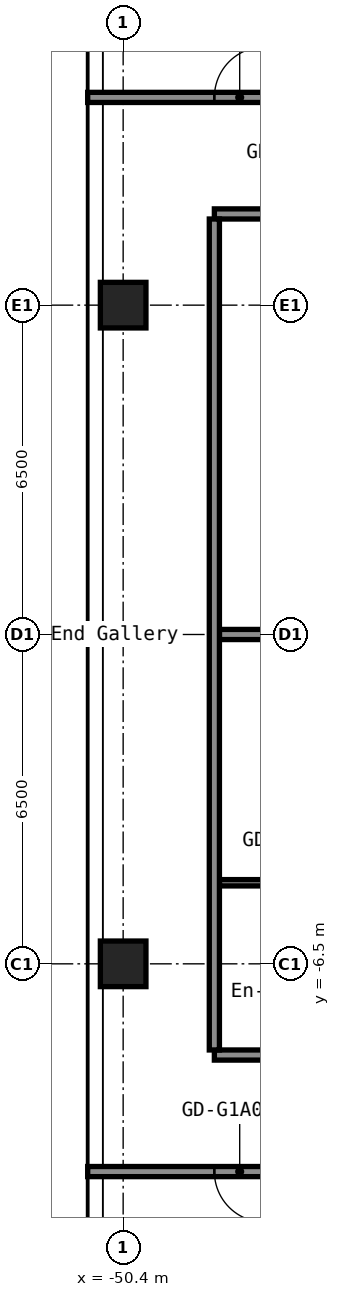
"""IFC4 building model, lengths in metres.
Left out: names, types, materials, properties, quantities, classifications, styles, units other than length and angle.
Written with IfcOpenShell. Run it as: python <this file> out.ifc"""

import sys

from ifc_helpers import new_model, si_unit, direction, frame, frame_2d, origin, origin_2d, place, context, subcontext, project, spatial, rectangle, hollow_rectangle, extrude, element, fill, save


model = new_model("IFC4")
c1 = context("Model", 3, precision=1e-05, world=origin(), true_north=direction((0.0, 1.0)))
c2 = subcontext(c1, "Body", "Model", "MODEL_VIEW")
j1 = project(units=[si_unit("LENGTHUNIT", "METRE"), si_unit("PLANEANGLEUNIT", "RADIAN")], contexts=[c1])
p1 = place(None, origin())
s1 = spatial("IfcSite", under=j1, at=p1, CompositionType="ELEMENT")
p2 = place(p1, origin())
s2 = spatial("IfcBuilding", under=s1, at=p2, CompositionType="ELEMENT")
p3 = place(p2, frame((0.0, 0.0, 19.8)))
s3 = spatial("IfcBuildingStorey", under=s2, at=p3, CompositionType="ELEMENT", Elevation=19.8)
for number, where, z_axis, x_axis in (
    (1, (-50.4, -6.5, 0.0), (0.0, 0.0, 1.0), (1.0, 0.0, 0.0)),
    (2, (-50.4, 6.5, 0.0), (0.0, 0.0, 1.0), (1.0, 0.0, 0.0)),
):
    element("IfcColumn", number, at=place(p3, frame(where, z_axis=z_axis, x_axis=x_axis)), inside=s3, PredefinedType="COLUMN", context=c2, shape_type="SweptSolid", body=[
        extrude(hollow_rectangle(XDim=0.9, YDim=0.9, WallThickness=0.036, at=origin_2d()), origin(), (0.0, 0.0, 1.0), 2.8),
    ])
p4 = place(p3, frame((-51.1, -10.6, 0.0), z_axis=(0.0, 0.0, 1.0), x_axis=(1.0, 0.0, 0.0)))
e3 = element("IfcWall", 3, at=p4, inside=s3, PredefinedType="PARTITIONING", context=c2, shape_type="SweptSolid", body=[
    extrude(rectangle(XDim=34.3, YDim=0.2, at=frame_2d((17.15, 0.0))), origin(), (0.0, 0.0, 1.0), 2.8),
])
p5 = place(p4, frame((2.5, 0.0, 0.0)))
e4 = element("IfcOpeningElement", 4, at=p5, cuts=e3, PredefinedType="OPENING", context=c2, shape_type="SweptSolid", body=[
    extrude(rectangle(XDim=1.0, YDim=2.1, at=frame_2d((0.5, 1.05))), frame((0.0, 0.11, 0.0), z_axis=(0.0, -1.0, 0.0), x_axis=(1.0, 0.0, 0.0)), (0.0, 0.0, 1.0), 0.22),
])
p6 = place(p4, frame((11.1, 0.0, 0.0)))
e5 = element("IfcOpeningElement", 5, at=p6, cuts=e3, PredefinedType="OPENING", context=c2, shape_type="SweptSolid", body=[
    extrude(rectangle(XDim=1.0, YDim=2.1, at=frame_2d((0.5, 1.05))), frame((0.0, 0.11, 0.0), z_axis=(0.0, -1.0, 0.0), x_axis=(1.0, 0.0, 0.0)), (0.0, 0.0, 1.0), 0.22),
])
p7 = place(p4, frame((19.5, 0.0, 0.0)))
e6 = element("IfcOpeningElement", 6, at=p7, cuts=e3, PredefinedType="OPENING", context=c2, shape_type="SweptSolid", body=[
    extrude(rectangle(XDim=1.0, YDim=2.1, at=frame_2d((0.5, 1.05))), frame((0.0, 0.11, 0.0), z_axis=(0.0, -1.0, 0.0), x_axis=(1.0, 0.0, 0.0)), (0.0, 0.0, 1.0), 0.22),
])
p8 = place(p4, frame((27.9, 0.0, 0.0)))
e7 = element("IfcOpeningElement", 7, at=p8, cuts=e3, PredefinedType="OPENING", context=c2, shape_type="SweptSolid", body=[
    extrude(rectangle(XDim=1.0, YDim=2.1, at=frame_2d((0.5, 1.05))), frame((0.0, 0.11, 0.0), z_axis=(0.0, -1.0, 0.0), x_axis=(1.0, 0.0, 0.0)), (0.0, 0.0, 1.0), 0.22),
])
p9 = place(p3, frame((-48.6, -8.3, 0.0), z_axis=(0.0, 0.0, 1.0), x_axis=(1.0, 0.0, 0.0)))
e8 = element("IfcWall", 8, at=p9, inside=s3, PredefinedType="PARTITIONING", context=c2, shape_type="SweptSolid", body=[
    extrude(rectangle(XDim=15.0, YDim=0.2, at=frame_2d((7.5, 0.0))), origin(), (0.0, 0.0, 1.0), 2.8),
])
p10 = place(p9, frame((4.5, 0.0, 0.0)))
e9 = element("IfcOpeningElement", 9, at=p10, cuts=e8, PredefinedType="OPENING", context=c2, shape_type="SweptSolid", body=[
    extrude(rectangle(XDim=1.0, YDim=2.1, at=frame_2d((0.5, 1.05))), frame((0.0, 0.11, 0.0), z_axis=(0.0, -1.0, 0.0), x_axis=(1.0, 0.0, 0.0)), (0.0, 0.0, 1.0), 0.22),
])
p11 = place(p9, frame((7.66, 0.0, 0.0)))
e10 = element("IfcOpeningElement", 10, at=p11, cuts=e8, PredefinedType="OPENING", context=c2, shape_type="SweptSolid", body=[
    extrude(rectangle(XDim=0.9, YDim=2.1, at=frame_2d((0.45, 1.05))), frame((0.0, 0.11, 0.0), z_axis=(0.0, -1.0, 0.0), x_axis=(1.0, 0.0, 0.0)), (0.0, 0.0, 1.0), 0.22),
])
p12 = place(p9, frame((11.86, 0.0, 0.0)))
e11 = element("IfcOpeningElement", 11, at=p12, cuts=e8, PredefinedType="OPENING", context=c2, shape_type="SweptSolid", body=[
    extrude(rectangle(XDim=0.9, YDim=2.1, at=frame_2d((0.45, 1.05))), frame((0.0, 0.11, 0.0), z_axis=(0.0, -1.0, 0.0), x_axis=(1.0, 0.0, 0.0)), (0.0, 0.0, 1.0), 0.22),
])
p13 = place(p3, frame((-48.5, -4.9, 0.0), z_axis=(0.0, 0.0, 1.0), x_axis=(1.0, 0.0, 0.0)))
e12 = element("IfcWall", 12, at=p13, inside=s3, PredefinedType="PARTITIONING", context=c2, shape_type="SweptSolid", body=[
    extrude(rectangle(XDim=3.238, YDim=0.125, at=frame_2d((1.619, 0.0))), origin(), (0.0, 0.0, 1.0), 2.8),
])
p14 = place(p13, frame((1.2, 0.0, 0.0)))
e13 = element("IfcOpeningElement", 13, at=p14, cuts=e12, PredefinedType="OPENING", context=c2, shape_type="SweptSolid", body=[
    extrude(rectangle(XDim=0.8, YDim=2.1, at=frame_2d((0.4, 1.05))), frame((0.0, 0.073, 0.0), z_axis=(0.0, -1.0, 0.0), x_axis=(1.0, 0.0, 0.0)), (0.0, 0.0, 1.0), 0.145),
])
p15 = place(p3, frame((-48.5, 0.0, 0.0), z_axis=(0.0, 0.0, 1.0), x_axis=(1.0, 0.0, 0.0)))
e14 = element("IfcWall", 14, at=p15, inside=s3, PredefinedType="PARTITIONING", context=c2, shape_type="SweptSolid", body=[
    extrude(rectangle(XDim=14.9, YDim=0.2, at=frame_2d((7.45, 0.0))), origin(), (0.0, 0.0, 1.0), 2.8),
])
p16 = place(p3, frame((-48.6, 8.3, 0.0), z_axis=(0.0, 0.0, 1.0), x_axis=(1.0, 0.0, 0.0)))
e15 = element("IfcWall", 15, at=p16, inside=s3, PredefinedType="PARTITIONING", context=c2, shape_type="SweptSolid", body=[
    extrude(rectangle(XDim=15.0, YDim=0.2, at=frame_2d((7.5, 0.0))), origin(), (0.0, 0.0, 1.0), 2.8),
])
p17 = place(p16, frame((1.33, 0.0, 0.0)))
e16 = element("IfcOpeningElement", 16, at=p17, cuts=e15, PredefinedType="OPENING", context=c2, shape_type="SweptSolid", body=[
    extrude(rectangle(XDim=0.9, YDim=2.1, at=frame_2d((0.45, 1.05))), frame((0.0, 0.11, 0.0), z_axis=(0.0, -1.0, 0.0), x_axis=(1.0, 0.0, 0.0)), (0.0, 0.0, 1.0), 0.22),
])
p18 = place(p16, frame((4.63, 0.0, 0.0)))
e17 = element("IfcOpeningElement", 17, at=p18, cuts=e15, PredefinedType="OPENING", context=c2, shape_type="SweptSolid", body=[
    extrude(rectangle(XDim=0.9, YDim=2.1, at=frame_2d((0.45, 1.05))), frame((0.0, 0.11, 0.0), z_axis=(0.0, -1.0, 0.0), x_axis=(1.0, 0.0, 0.0)), (0.0, 0.0, 1.0), 0.22),
])
p19 = place(p16, frame((10.8, 0.0, 0.0)))
e18 = element("IfcOpeningElement", 18, at=p19, cuts=e15, PredefinedType="OPENING", context=c2, shape_type="SweptSolid", body=[
    extrude(rectangle(XDim=1.6, YDim=2.1, at=frame_2d((0.8, 1.05))), frame((0.0, 0.11, 0.0), z_axis=(0.0, -1.0, 0.0), x_axis=(1.0, 0.0, 0.0)), (0.0, 0.0, 1.0), 0.22),
])
p20 = place(p3, frame((-51.1, 10.6, 0.0), z_axis=(0.0, 0.0, 1.0), x_axis=(1.0, 0.0, 0.0)))
e19 = element("IfcWall", 19, at=p20, inside=s3, PredefinedType="PARTITIONING", context=c2, shape_type="SweptSolid", body=[
    extrude(rectangle(XDim=34.3, YDim=0.2, at=frame_2d((17.15, 0.0))), origin(), (0.0, 0.0, 1.0), 2.8),
])
p21 = place(p20, frame((2.5, 0.0, 0.0)))
e20 = element("IfcOpeningElement", 20, at=p21, cuts=e19, PredefinedType="OPENING", context=c2, shape_type="SweptSolid", body=[
    extrude(rectangle(XDim=1.0, YDim=2.1, at=frame_2d((0.5, 1.05))), frame((0.0, 0.11, 0.0), z_axis=(0.0, -1.0, 0.0), x_axis=(1.0, 0.0, 0.0)), (0.0, 0.0, 1.0), 0.22),
])
p22 = place(p20, frame((14.5, 0.0, 0.0)))
e21 = element("IfcOpeningElement", 21, at=p22, cuts=e19, PredefinedType="OPENING", context=c2, shape_type="SweptSolid", body=[
    extrude(rectangle(XDim=1.0, YDim=2.1, at=frame_2d((0.5, 1.05))), frame((0.0, 0.11, 0.0), z_axis=(0.0, -1.0, 0.0), x_axis=(1.0, 0.0, 0.0)), (0.0, 0.0, 1.0), 0.22),
])
p23 = place(p20, frame((19.5, 0.0, 0.0)))
e22 = element("IfcOpeningElement", 22, at=p23, cuts=e19, PredefinedType="OPENING", context=c2, shape_type="SweptSolid", body=[
    extrude(rectangle(XDim=1.0, YDim=2.1, at=frame_2d((0.5, 1.05))), frame((0.0, 0.11, 0.0), z_axis=(0.0, -1.0, 0.0), x_axis=(1.0, 0.0, 0.0)), (0.0, 0.0, 1.0), 0.22),
])
p24 = place(p20, frame((27.9, 0.0, 0.0)))
e23 = element("IfcOpeningElement", 23, at=p24, cuts=e19, PredefinedType="OPENING", context=c2, shape_type="SweptSolid", body=[
    extrude(rectangle(XDim=1.0, YDim=2.1, at=frame_2d((0.5, 1.05))), frame((0.0, 0.11, 0.0), z_axis=(0.0, -1.0, 0.0), x_axis=(1.0, 0.0, 0.0)), (0.0, 0.0, 1.0), 0.22),
])
p25 = place(p3, frame((-48.6, -8.2, 0.0), z_axis=(0.0, 0.0, 1.0), x_axis=(0.0, 1.0, 0.0)))
e24 = element("IfcWall", 24, at=p25, inside=s3, PredefinedType="PARTITIONING", context=c2, shape_type="SweptSolid", body=[
    extrude(rectangle(XDim=16.4, YDim=0.2, at=frame_2d((8.2, 0.0))), origin(), (0.0, 0.0, 1.0), 2.8),
])
p26 = place(p5, origin())
e25 = element("IfcDoor", 25, at=p26, inside=s3, OperationType="SINGLE_SWING_RIGHT", PredefinedType="DOOR", context=c2, shape_type="SweptSolid", body=[
    extrude(rectangle(XDim=1.0, YDim=2.1, at=frame_2d((0.5, 1.05))), frame((0.0, 0.025, 0.0), z_axis=(0.0, -1.0, 0.0), x_axis=(1.0, 0.0, 0.0)), (0.0, 0.0, 1.0), 0.05),
])
fill(e4, e25)
p27 = place(p21, origin())
e26 = element("IfcDoor", 26, at=p27, inside=s3, OperationType="SINGLE_SWING_LEFT", PredefinedType="DOOR", context=c2, shape_type="SweptSolid", body=[
    extrude(rectangle(XDim=1.0, YDim=2.1, at=frame_2d((0.5, 1.05))), frame((0.0, 0.025, 0.0), z_axis=(0.0, -1.0, 0.0), x_axis=(1.0, 0.0, 0.0)), (0.0, 0.0, 1.0), 0.05),
])
fill(e20, e26)
save(model, sys.argv[1])
